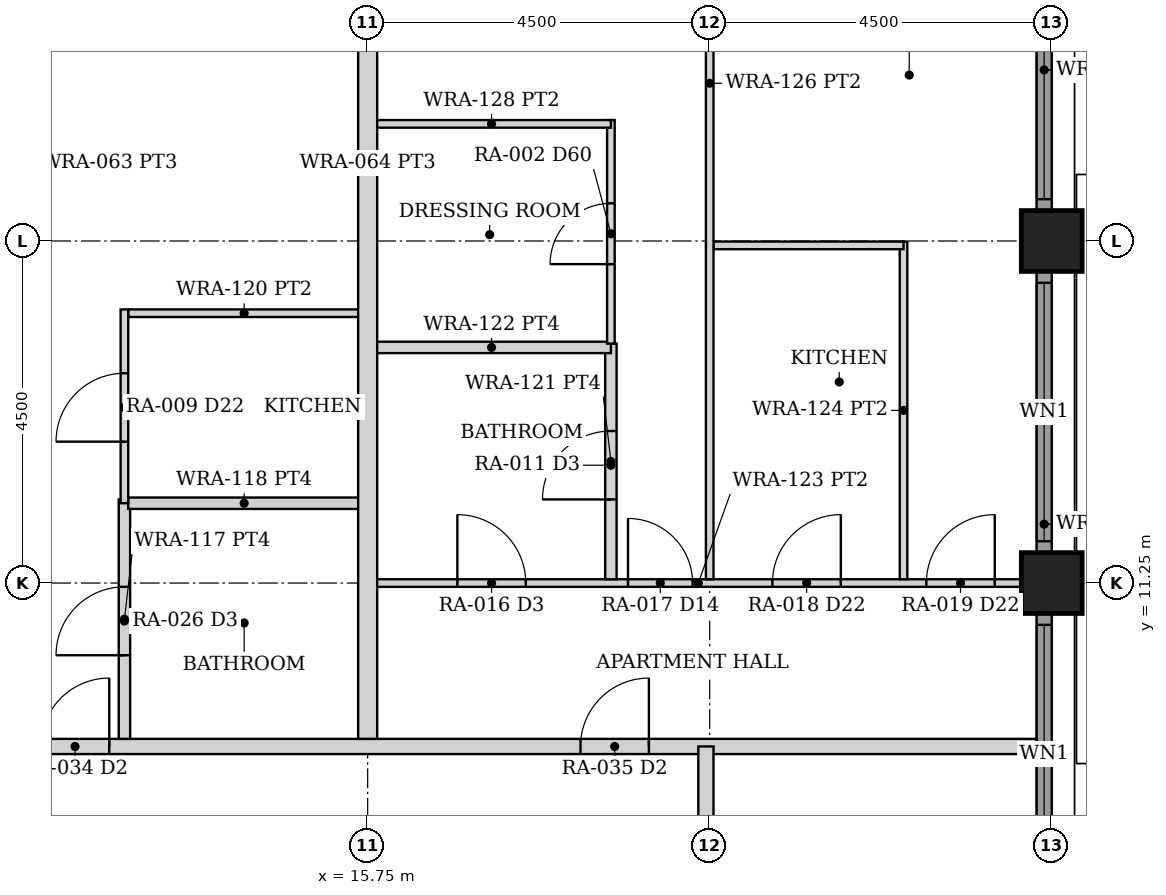
"""IFC4 building model, lengths in metres.
Left out: names, types, materials, properties, quantities, classifications, styles, units other than length and angle.
Written with IfcOpenShell. Run it as: python <this file> out.ifc"""

import sys

from ifc_helpers import new_model, si_unit, direction, frame, frame_2d, origin, origin_2d, place, context, subcontext, project, spatial, rectangle, hollow_rectangle, extrude, element, fill, save


model = new_model("IFC4")
c1 = context("Model", 3, precision=1e-05, world=origin(), true_north=direction((0.0, 1.0)))
c2 = subcontext(c1, "Body", "Model", "MODEL_VIEW")
j1 = project(units=[si_unit("LENGTHUNIT", "METRE"), si_unit("PLANEANGLEUNIT", "RADIAN")], contexts=[c1])
p1 = place(None, origin())
s1 = spatial("IfcSite", under=j1, at=p1, CompositionType="ELEMENT")
p2 = place(p1, origin())
s2 = spatial("IfcBuilding", under=s1, at=p2, CompositionType="ELEMENT")
p3 = place(p2, frame((0.0, 0.0, 26.5)))
s3 = spatial("IfcBuildingStorey", under=s2, at=p3, CompositionType="ELEMENT", Elevation=26.5)
for number, where, z_axis, x_axis in (
    (1, (24.75, 11.25, 0.0), (0.0, 0.0, 1.0), (1.0, 0.0, 0.0)),
    (2, (24.75, 15.75, 0.0), (0.0, 0.0, 1.0), (1.0, 0.0, 0.0)),
):
    element("IfcColumn", number, at=place(p3, frame(where, z_axis=z_axis, x_axis=x_axis)), inside=s3, PredefinedType="COLUMN", context=c2, shape_type="SweptSolid", body=[
        extrude(hollow_rectangle(XDim=0.8, YDim=0.8, WallThickness=0.08, at=origin_2d()), origin(), (0.0, 0.0, 1.0), 3.5),
    ])
p4 = place(p3, frame((24.65, 7.155, 0.0), z_axis=(0.0, 0.0, 1.0), x_axis=(0.0, 1.0, 0.0)))
e3 = element("IfcWall", 3, at=p4, inside=s3, PredefinedType="SOLIDWALL", context=c2, shape_type="SweptSolid", body=[
    extrude(rectangle(XDim=3.69, YDim=0.2, at=frame_2d((1.845, 0.0))), origin(), (0.0, 0.0, 1.0), 2.379),
])
p5 = place(p4, frame((0.145, 0.0, 0.3)))
e4 = element("IfcOpeningElement", 4, at=p5, cuts=e3, PredefinedType="OPENING", context=c2, shape_type="SweptSolid", body=[
    extrude(rectangle(XDim=3.4, YDim=1.929, at=frame_2d((1.7, 0.964))), frame((0.0, 0.11, 0.0), z_axis=(0.0, -1.0, 0.0), x_axis=(1.0, 0.0, 0.0)), (0.0, 0.0, 1.0), 0.22),
])
p6 = place(p3, frame((24.65, 11.655, 0.0), z_axis=(0.0, 0.0, 1.0), x_axis=(0.0, 1.0, 0.0)))
e5 = element("IfcWall", 5, at=p6, inside=s3, PredefinedType="SOLIDWALL", context=c2, shape_type="SweptSolid", body=[
    extrude(rectangle(XDim=3.69, YDim=0.2, at=frame_2d((1.845, 0.0))), origin(), (0.0, 0.0, 1.0), 2.379),
])
p7 = place(p6, frame((0.145, 0.0, 0.3)))
e6 = element("IfcOpeningElement", 6, at=p7, cuts=e5, PredefinedType="OPENING", context=c2, shape_type="SweptSolid", body=[
    extrude(rectangle(XDim=3.4, YDim=1.929, at=frame_2d((1.7, 0.964))), frame((0.0, 0.11, 0.0), z_axis=(0.0, -1.0, 0.0), x_axis=(1.0, 0.0, 0.0)), (0.0, 0.0, 1.0), 0.22),
])
p8 = place(p3, frame((24.65, 16.155, 0.0), z_axis=(0.0, 0.0, 1.0), x_axis=(0.0, 1.0, 0.0)))
e7 = element("IfcWall", 7, at=p8, inside=s3, PredefinedType="SOLIDWALL", context=c2, shape_type="SweptSolid", body=[
    extrude(rectangle(XDim=3.69, YDim=0.2, at=frame_2d((1.845, 0.0))), origin(), (0.0, 0.0, 1.0), 2.379),
])
p9 = place(p8, frame((0.145, 0.0, 0.3)))
e8 = element("IfcOpeningElement", 8, at=p9, cuts=e7, PredefinedType="OPENING", context=c2, shape_type="SweptSolid", body=[
    extrude(rectangle(XDim=3.4, YDim=1.929, at=frame_2d((1.7, 0.964))), frame((0.0, 0.11, 0.0), z_axis=(0.0, -1.0, 0.0), x_axis=(1.0, 0.0, 0.0)), (0.0, 0.0, 1.0), 0.22),
])
p10 = place(p3, frame((-24.55, 9.1, 0.0), z_axis=(0.0, 0.0, 1.0), x_axis=(1.0, 0.0, 0.0)))
e9 = element("IfcWall", 9, at=p10, inside=s3, PredefinedType="PARTITIONING", context=c2, shape_type="SweptSolid", body=[
    extrude(rectangle(XDim=49.1, YDim=0.2, at=frame_2d((24.55, 0.0))), origin(), (0.0, 0.0, 1.0), 2.373),
])
p11 = place(p10, frame((5.1, 0.0, 0.0)))
e10 = element("IfcOpeningElement", 10, at=p11, cuts=e9, PredefinedType="OPENING", context=c2, shape_type="SweptSolid", body=[
    extrude(rectangle(XDim=0.9, YDim=2.1, at=frame_2d((0.45, 1.05))), frame((0.0, 0.11, 0.0), z_axis=(0.0, -1.0, 0.0), x_axis=(1.0, 0.0, 0.0)), (0.0, 0.0, 1.0), 0.22),
])
p12 = place(p10, frame((9.0, 0.0, 0.0)))
e11 = element("IfcOpeningElement", 11, at=p12, cuts=e9, PredefinedType="OPENING", context=c2, shape_type="SweptSolid", body=[
    extrude(rectangle(XDim=0.9, YDim=2.1, at=frame_2d((0.45, 1.05))), frame((0.0, 0.11, 0.0), z_axis=(0.0, -1.0, 0.0), x_axis=(1.0, 0.0, 0.0)), (0.0, 0.0, 1.0), 0.22),
])
p13 = place(p10, frame((13.5, 0.0, 0.0)))
e12 = element("IfcOpeningElement", 12, at=p13, cuts=e9, PredefinedType="OPENING", context=c2, shape_type="SweptSolid", body=[
    extrude(rectangle(XDim=0.9, YDim=2.1, at=frame_2d((0.45, 1.05))), frame((0.0, 0.11, 0.0), z_axis=(0.0, -1.0, 0.0), x_axis=(1.0, 0.0, 0.0)), (0.0, 0.0, 1.0), 0.22),
])
p14 = place(p10, frame((18.0, 0.0, 0.0)))
e13 = element("IfcOpeningElement", 13, at=p14, cuts=e9, PredefinedType="OPENING", context=c2, shape_type="SweptSolid", body=[
    extrude(rectangle(XDim=0.9, YDim=2.1, at=frame_2d((0.45, 1.05))), frame((0.0, 0.11, 0.0), z_axis=(0.0, -1.0, 0.0), x_axis=(1.0, 0.0, 0.0)), (0.0, 0.0, 1.0), 0.22),
])
p15 = place(p10, frame((22.5, 0.0, 0.0)))
e14 = element("IfcOpeningElement", 14, at=p15, cuts=e9, PredefinedType="OPENING", context=c2, shape_type="SweptSolid", body=[
    extrude(rectangle(XDim=0.9, YDim=2.1, at=frame_2d((0.45, 1.05))), frame((0.0, 0.11, 0.0), z_axis=(0.0, -1.0, 0.0), x_axis=(1.0, 0.0, 0.0)), (0.0, 0.0, 1.0), 0.22),
])
p16 = place(p10, frame((27.0, 0.0, 0.0)))
e15 = element("IfcOpeningElement", 15, at=p16, cuts=e9, PredefinedType="OPENING", context=c2, shape_type="SweptSolid", body=[
    extrude(rectangle(XDim=0.9, YDim=2.1, at=frame_2d((0.45, 1.05))), frame((0.0, 0.11, 0.0), z_axis=(0.0, -1.0, 0.0), x_axis=(1.0, 0.0, 0.0)), (0.0, 0.0, 1.0), 0.22),
])
p17 = place(p10, frame((31.5, 0.0, 0.0)))
e16 = element("IfcOpeningElement", 16, at=p17, cuts=e9, PredefinedType="OPENING", context=c2, shape_type="SweptSolid", body=[
    extrude(rectangle(XDim=0.9, YDim=2.1, at=frame_2d((0.45, 1.05))), frame((0.0, 0.11, 0.0), z_axis=(0.0, -1.0, 0.0), x_axis=(1.0, 0.0, 0.0)), (0.0, 0.0, 1.0), 0.22),
])
p18 = place(p10, frame((36.0, 0.0, 0.0)))
e17 = element("IfcOpeningElement", 17, at=p18, cuts=e9, PredefinedType="OPENING", context=c2, shape_type="SweptSolid", body=[
    extrude(rectangle(XDim=0.9, YDim=2.1, at=frame_2d((0.45, 1.05))), frame((0.0, 0.11, 0.0), z_axis=(0.0, -1.0, 0.0), x_axis=(1.0, 0.0, 0.0)), (0.0, 0.0, 1.0), 0.22),
])
p19 = place(p10, frame((43.1, 0.0, 0.0)))
e18 = element("IfcOpeningElement", 18, at=p19, cuts=e9, PredefinedType="OPENING", context=c2, shape_type="SweptSolid", body=[
    extrude(rectangle(XDim=0.9, YDim=2.1, at=frame_2d((0.45, 1.05))), frame((0.0, 0.11, 0.0), z_axis=(0.0, -1.0, 0.0), x_axis=(1.0, 0.0, 0.0)), (0.0, 0.0, 1.0), 0.22),
])
p20 = place(p3, frame((20.2, -9.1, 0.0), z_axis=(0.0, 0.0, 1.0), x_axis=(0.0, 1.0, 0.0)))
e19 = element("IfcWall", 19, at=p20, inside=s3, PredefinedType="PARTITIONING", context=c2, shape_type="SweptSolid", body=[
    extrude(rectangle(XDim=18.2, YDim=0.2, at=frame_2d((9.1, 0.0))), origin(), (0.0, 0.0, 1.0), 2.373),
])
p21 = place(p20, frame((6.4, 0.0, 0.0)))
e20 = element("IfcOpeningElement", 20, at=p21, cuts=e19, PredefinedType="OPENING", context=c2, shape_type="SweptSolid", body=[
    extrude(rectangle(XDim=0.9, YDim=2.1, at=frame_2d((0.45, 1.05))), frame((0.0, 0.11, 0.0), z_axis=(0.0, -1.0, 0.0), x_axis=(1.0, 0.0, 0.0)), (0.0, 0.0, 1.0), 0.22),
])
p22 = place(p3, frame((12.55, 9.2, 0.0), z_axis=(0.0, 0.0, 1.0), x_axis=(0.0, 1.0, 0.0)))
e21 = element("IfcWall", 21, at=p22, inside=s3, PredefinedType="PARTITIONING", context=c2, shape_type="SweptSolid", body=[
    extrude(rectangle(XDim=3.15, YDim=0.15, at=frame_2d((1.575, 0.0))), origin(), (0.0, 0.0, 1.0), 2.373),
])
p23 = place(p22, frame((1.1, 0.0, 0.0)))
e22 = element("IfcOpeningElement", 22, at=p23, cuts=e21, PredefinedType="OPENING", context=c2, shape_type="SweptSolid", body=[
    extrude(rectangle(XDim=0.9, YDim=2.1, at=frame_2d((0.45, 1.05))), frame((0.0, 0.085, 0.0), z_axis=(0.0, -1.0, 0.0), x_axis=(1.0, 0.0, 0.0)), (0.0, 0.0, 1.0), 0.17),
])
p24 = place(p3, frame((12.6, 12.3, 0.0), z_axis=(0.0, 0.0, 1.0), x_axis=(1.0, 0.0, 0.0)))
e23 = element("IfcWall", 23, at=p24, inside=s3, PredefinedType="PARTITIONING", context=c2, shape_type="SweptSolid", body=[
    extrude(rectangle(XDim=3.05, YDim=0.15, at=frame_2d((1.525, 0.0))), origin(), (0.0, 0.0, 1.0), 2.373),
])
p25 = place(p3, frame((12.6, 14.8, 0.0), z_axis=(0.0, 0.0, 1.0), x_axis=(1.0, 0.0, 0.0)))
e24 = element("IfcWall", 24, at=p25, inside=s3, PredefinedType="PARTITIONING", context=c2, shape_type="SweptSolid", body=[
    extrude(rectangle(XDim=3.05, YDim=0.1, at=frame_2d((1.525, 0.0))), origin(), (0.0, 0.0, 1.0), 2.373),
])
p26 = place(p3, frame((12.55, 12.3, 0.0), z_axis=(0.0, 0.0, 1.0), x_axis=(0.0, 1.0, 0.0)))
e25 = element("IfcWall", 25, at=p26, inside=s3, PredefinedType="PARTITIONING", context=c2, shape_type="SweptSolid", body=[
    extrude(rectangle(XDim=2.55, YDim=0.1, at=frame_2d((1.275, 0.0))), origin(), (0.0, 0.0, 1.0), 2.373),
])
p27 = place(p26, frame((0.81, 0.0, 0.0)))
e26 = element("IfcOpeningElement", 26, at=p27, cuts=e25, PredefinedType="OPENING", context=c2, shape_type="SweptSolid", body=[
    extrude(rectangle(XDim=0.9, YDim=2.1, at=frame_2d((0.45, 1.05))), frame((0.0, 0.06, 0.0), z_axis=(0.0, -1.0, 0.0), x_axis=(1.0, 0.0, 0.0)), (0.0, 0.0, 1.0), 0.12),
])
p28 = place(p3, frame((15.85, 11.25, 0.0), z_axis=(0.0, 0.0, 1.0), x_axis=(1.0, 0.0, 0.0)))
e27 = element("IfcWall", 27, at=p28, inside=s3, PredefinedType="PARTITIONING", context=c2, shape_type="SweptSolid", body=[
    extrude(rectangle(XDim=8.5, YDim=0.1, at=frame_2d((4.25, 0.0))), origin(), (0.0, 0.0, 1.0), 2.373),
])
p29 = place(p28, frame((5.225, 0.0, 0.0)))
e28 = element("IfcOpeningElement", 28, at=p29, cuts=e27, PredefinedType="OPENING", context=c2, shape_type="SweptSolid", body=[
    extrude(rectangle(XDim=0.9, YDim=2.1, at=frame_2d((0.45, 1.05))), frame((0.0, 0.06, 0.0), z_axis=(0.0, -1.0, 0.0), x_axis=(1.0, 0.0, 0.0)), (0.0, 0.0, 1.0), 0.12),
])
p30 = place(p28, frame((7.25, 0.0, 0.0)))
e29 = element("IfcOpeningElement", 29, at=p30, cuts=e27, PredefinedType="OPENING", context=c2, shape_type="SweptSolid", body=[
    extrude(rectangle(XDim=0.9, YDim=2.1, at=frame_2d((0.45, 1.05))), frame((0.0, 0.06, 0.0), z_axis=(0.0, -1.0, 0.0), x_axis=(1.0, 0.0, 0.0)), (0.0, 0.0, 1.0), 0.12),
])
p31 = place(p28, frame((3.325, 0.0, 0.0)))
e30 = element("IfcOpeningElement", 30, at=p31, cuts=e27, PredefinedType="OPENING", context=c2, shape_type="SweptSolid", body=[
    extrude(rectangle(XDim=0.85, YDim=2.1, at=frame_2d((0.425, 1.05))), frame((0.0, 0.06, 0.0), z_axis=(0.0, -1.0, 0.0), x_axis=(1.0, 0.0, 0.0)), (0.0, 0.0, 1.0), 0.12),
])
p32 = place(p28, frame((1.08, 0.0, 0.0)))
e31 = element("IfcOpeningElement", 31, at=p32, cuts=e27, PredefinedType="OPENING", context=c2, shape_type="SweptSolid", body=[
    extrude(rectangle(XDim=0.9, YDim=2.1, at=frame_2d((0.45, 1.05))), frame((0.0, 0.06, 0.0), z_axis=(0.0, -1.0, 0.0), x_axis=(1.0, 0.0, 0.0)), (0.0, 0.0, 1.0), 0.12),
])
p33 = place(p3, frame((22.8, 11.3, 0.0), z_axis=(0.0, 0.0, 1.0), x_axis=(0.0, 1.0, 0.0)))
e32 = element("IfcWall", 32, at=p33, inside=s3, PredefinedType="PARTITIONING", context=c2, shape_type="SweptSolid", body=[
    extrude(rectangle(XDim=4.442, YDim=0.1, at=frame_2d((2.221, 0.0))), origin(), (0.0, 0.0, 1.0), 2.373),
])
p34 = place(p3, frame((20.3, 15.692, 0.0), z_axis=(0.0, 0.0, 1.0), x_axis=(1.0, 0.0, 0.0)))
e33 = element("IfcWall", 33, at=p34, inside=s3, PredefinedType="PARTITIONING", context=c2, shape_type="SweptSolid", body=[
    extrude(rectangle(XDim=2.5, YDim=0.1, at=frame_2d((1.25, 0.0))), origin(), (0.0, 0.0, 1.0), 2.373),
])
p35 = place(p3, frame((20.25, 11.3, 0.0), z_axis=(0.0, 0.0, 1.0), x_axis=(0.0, 1.0, 0.0)))
e34 = element("IfcWall", 34, at=p35, inside=s3, PredefinedType="PARTITIONING", context=c2, shape_type="SweptSolid", body=[
    extrude(rectangle(XDim=13.05, YDim=0.1, at=frame_2d((6.525, 0.0))), origin(), (0.0, 0.0, 1.0), 2.373),
])
p36 = place(p3, frame((18.95, 11.3, 0.0), z_axis=(0.0, 0.0, 1.0), x_axis=(0.0, 1.0, 0.0)))
e35 = element("IfcWall", 35, at=p36, inside=s3, PredefinedType="PARTITIONING", context=c2, shape_type="SweptSolid", body=[
    extrude(rectangle(XDim=3.1, YDim=0.15, at=frame_2d((1.55, 0.0))), origin(), (0.0, 0.0, 1.0), 2.373),
])
p37 = place(p36, frame((1.05, 0.0, 0.0)))
e36 = element("IfcOpeningElement", 36, at=p37, cuts=e35, PredefinedType="OPENING", context=c2, shape_type="SweptSolid", body=[
    extrude(rectangle(XDim=0.9, YDim=2.1, at=frame_2d((0.45, 1.05))), frame((0.0, 0.085, 0.0), z_axis=(0.0, -1.0, 0.0), x_axis=(1.0, 0.0, 0.0)), (0.0, 0.0, 1.0), 0.17),
])
p38 = place(p3, frame((15.81, 14.35, 0.0), z_axis=(0.0, 0.0, 1.0), x_axis=(1.0, 0.0, 0.0)))
e37 = element("IfcWall", 37, at=p38, inside=s3, PredefinedType="PARTITIONING", context=c2, shape_type="SweptSolid", body=[
    extrude(rectangle(XDim=3.14, YDim=0.15, at=frame_2d((1.57, 0.0))), origin(), (0.0, 0.0, 1.0), 2.373),
])
p39 = place(p3, frame((18.95, 14.4, 0.0), z_axis=(0.0, 0.0, 1.0), x_axis=(0.0, 1.0, 0.0)))
e38 = element("IfcWall", 38, at=p39, inside=s3, PredefinedType="PARTITIONING", context=c2, shape_type="SweptSolid", body=[
    extrude(rectangle(XDim=2.941, YDim=0.1, at=frame_2d((1.47, 0.0))), origin(), (0.0, 0.0, 1.0), 2.373),
])
p40 = place(p39, frame((1.045, 0.0, 0.0)))
e39 = element("IfcOpeningElement", 39, at=p40, cuts=e38, PredefinedType="OPENING", context=c2, shape_type="SweptSolid", body=[
    extrude(rectangle(XDim=0.8, YDim=2.1, at=frame_2d((0.4, 1.05))), frame((0.0, 0.06, 0.0), z_axis=(0.0, -1.0, 0.0), x_axis=(1.0, 0.0, 0.0)), (0.0, 0.0, 1.0), 0.12),
])
p41 = place(p3, frame((15.81, 17.291, 0.0), z_axis=(0.0, 0.0, 1.0), x_axis=(1.0, 0.0, 0.0)))
e40 = element("IfcWall", 40, at=p41, inside=s3, PredefinedType="PARTITIONING", context=c2, shape_type="SweptSolid", body=[
    extrude(rectangle(XDim=3.14, YDim=0.1, at=frame_2d((1.57, 0.0))), origin(), (0.0, 0.0, 1.0), 2.373),
])
p42 = place(p3, frame((15.75, 9.2, 0.0), z_axis=(0.0, 0.0, 1.0), x_axis=(0.0, 1.0, 0.0)))
e41 = element("IfcWall", 41, at=p42, inside=s3, PredefinedType="PARTITIONING", context=c2, shape_type="SweptSolid", body=[
    extrude(rectangle(XDim=15.15, YDim=0.25, at=frame_2d((7.575, 0.0))), origin(), (0.0, 0.0, 1.0), 2.373),
])
p43 = place(p5, origin())
e42 = element("IfcWindow", 42, at=p43, inside=s3, PartitioningType="SINGLE_PANEL", PredefinedType="WINDOW", context=c2, shape_type="SweptSolid", body=[
    extrude(rectangle(XDim=3.4, YDim=1.929, at=frame_2d((1.7, 0.964))), frame((0.0, 0.03, 0.0), z_axis=(0.0, -1.0, 0.0), x_axis=(1.0, 0.0, 0.0)), (0.0, 0.0, 1.0), 0.06),
])
fill(e4, e42)
p44 = place(p7, origin())
e43 = element("IfcWindow", 43, at=p44, inside=s3, PartitioningType="SINGLE_PANEL", PredefinedType="WINDOW", context=c2, shape_type="SweptSolid", body=[
    extrude(rectangle(XDim=3.4, YDim=1.929, at=frame_2d((1.7, 0.964))), frame((0.0, 0.03, 0.0), z_axis=(0.0, -1.0, 0.0), x_axis=(1.0, 0.0, 0.0)), (0.0, 0.0, 1.0), 0.06),
])
fill(e6, e43)
p45 = place(p9, origin())
e44 = element("IfcWindow", 44, at=p45, inside=s3, PartitioningType="SINGLE_PANEL", PredefinedType="WINDOW", context=c2, shape_type="SweptSolid", body=[
    extrude(rectangle(XDim=3.4, YDim=1.929, at=frame_2d((1.7, 0.964))), frame((0.0, 0.03, 0.0), z_axis=(0.0, -1.0, 0.0), x_axis=(1.0, 0.0, 0.0)), (0.0, 0.0, 1.0), 0.06),
])
fill(e8, e44)
p46 = place(p18, origin())
e45 = element("IfcDoor", 45, at=p46, inside=s3, OperationType="SINGLE_SWING_RIGHT", PredefinedType="DOOR", context=c2, shape_type="SweptSolid", body=[
    extrude(rectangle(XDim=0.9, YDim=2.1, at=frame_2d((0.45, 1.05))), frame((0.0, 0.025, 0.0), z_axis=(0.0, -1.0, 0.0), x_axis=(1.0, 0.0, 0.0)), (0.0, 0.0, 1.0), 0.05),
])
fill(e17, e45)
p47 = place(p23, origin())
e46 = element("IfcDoor", 46, at=p47, inside=s3, OperationType="SINGLE_SWING_LEFT", PredefinedType="DOOR", context=c2, shape_type="SweptSolid", body=[
    extrude(rectangle(XDim=0.9, YDim=2.1, at=frame_2d((0.45, 1.05))), frame((0.0, 0.025, 0.0), z_axis=(0.0, -1.0, 0.0), x_axis=(1.0, 0.0, 0.0)), (0.0, 0.0, 1.0), 0.05),
])
fill(e22, e46)
p48 = place(p27, origin())
e47 = element("IfcDoor", 47, at=p48, inside=s3, OperationType="SINGLE_SWING_LEFT", PredefinedType="DOOR", context=c2, shape_type="SweptSolid", body=[
    extrude(rectangle(XDim=0.9, YDim=2.1, at=frame_2d((0.45, 1.05))), frame((0.0, 0.025, 0.0), z_axis=(0.0, -1.0, 0.0), x_axis=(1.0, 0.0, 0.0)), (0.0, 0.0, 1.0), 0.05),
])
fill(e26, e47)
p49 = place(p19, origin())
e48 = element("IfcDoor", 48, at=p49, inside=s3, OperationType="SINGLE_SWING_RIGHT", PredefinedType="DOOR", context=c2, shape_type="SweptSolid", body=[
    extrude(rectangle(XDim=0.9, YDim=2.1, at=frame_2d((0.45, 1.05))), frame((0.0, 0.025, 0.0), z_axis=(0.0, -1.0, 0.0), x_axis=(1.0, 0.0, 0.0)), (0.0, 0.0, 1.0), 0.05),
])
fill(e18, e48)
p50 = place(p29, origin())
e49 = element("IfcDoor", 49, at=p50, inside=s3, OperationType="SINGLE_SWING_RIGHT", PredefinedType="DOOR", context=c2, shape_type="SweptSolid", body=[
    extrude(rectangle(XDim=0.9, YDim=2.1, at=frame_2d((0.45, 1.05))), frame((0.0, 0.025, 0.0), z_axis=(0.0, -1.0, 0.0), x_axis=(1.0, 0.0, 0.0)), (0.0, 0.0, 1.0), 0.05),
])
fill(e28, e49)
p51 = place(p30, origin())
e50 = element("IfcDoor", 50, at=p51, inside=s3, OperationType="SINGLE_SWING_RIGHT", PredefinedType="DOOR", context=c2, shape_type="SweptSolid", body=[
    extrude(rectangle(XDim=0.9, YDim=2.1, at=frame_2d((0.45, 1.05))), frame((0.0, 0.025, 0.0), z_axis=(0.0, -1.0, 0.0), x_axis=(1.0, 0.0, 0.0)), (0.0, 0.0, 1.0), 0.05),
])
fill(e29, e50)
p52 = place(p31, origin())
e51 = element("IfcDoor", 51, at=p52, inside=s3, OperationType="SINGLE_SWING_LEFT", PredefinedType="DOOR", context=c2, shape_type="SweptSolid", body=[
    extrude(rectangle(XDim=0.85, YDim=2.1, at=frame_2d((0.425, 1.05))), frame((0.0, 0.025, 0.0), z_axis=(0.0, -1.0, 0.0), x_axis=(1.0, 0.0, 0.0)), (0.0, 0.0, 1.0), 0.05),
])
fill(e30, e51)
p53 = place(p37, origin())
e52 = element("IfcDoor", 52, at=p53, inside=s3, OperationType="SINGLE_SWING_LEFT", PredefinedType="DOOR", context=c2, shape_type="SweptSolid", body=[
    extrude(rectangle(XDim=0.9, YDim=2.1, at=frame_2d((0.45, 1.05))), frame((0.0, 0.025, 0.0), z_axis=(0.0, -1.0, 0.0), x_axis=(1.0, 0.0, 0.0)), (0.0, 0.0, 1.0), 0.05),
])
fill(e36, e52)
p54 = place(p32, origin())
e53 = element("IfcDoor", 53, at=p54, inside=s3, OperationType="SINGLE_SWING_LEFT", PredefinedType="DOOR", context=c2, shape_type="SweptSolid", body=[
    extrude(rectangle(XDim=0.9, YDim=2.1, at=frame_2d((0.45, 1.05))), frame((0.0, 0.025, 0.0), z_axis=(0.0, -1.0, 0.0), x_axis=(1.0, 0.0, 0.0)), (0.0, 0.0, 1.0), 0.05),
])
fill(e31, e53)
p55 = place(p40, origin())
e54 = element("IfcDoor", 54, at=p55, inside=s3, OperationType="SINGLE_SWING_LEFT", PredefinedType="DOOR", context=c2, shape_type="SweptSolid", body=[
    extrude(rectangle(XDim=0.8, YDim=2.1, at=frame_2d((0.4, 1.05))), frame((0.0, 0.025, 0.0), z_axis=(0.0, -1.0, 0.0), x_axis=(1.0, 0.0, 0.0)), (0.0, 0.0, 1.0), 0.05),
])
fill(e39, e54)
save(model, sys.argv[1])
